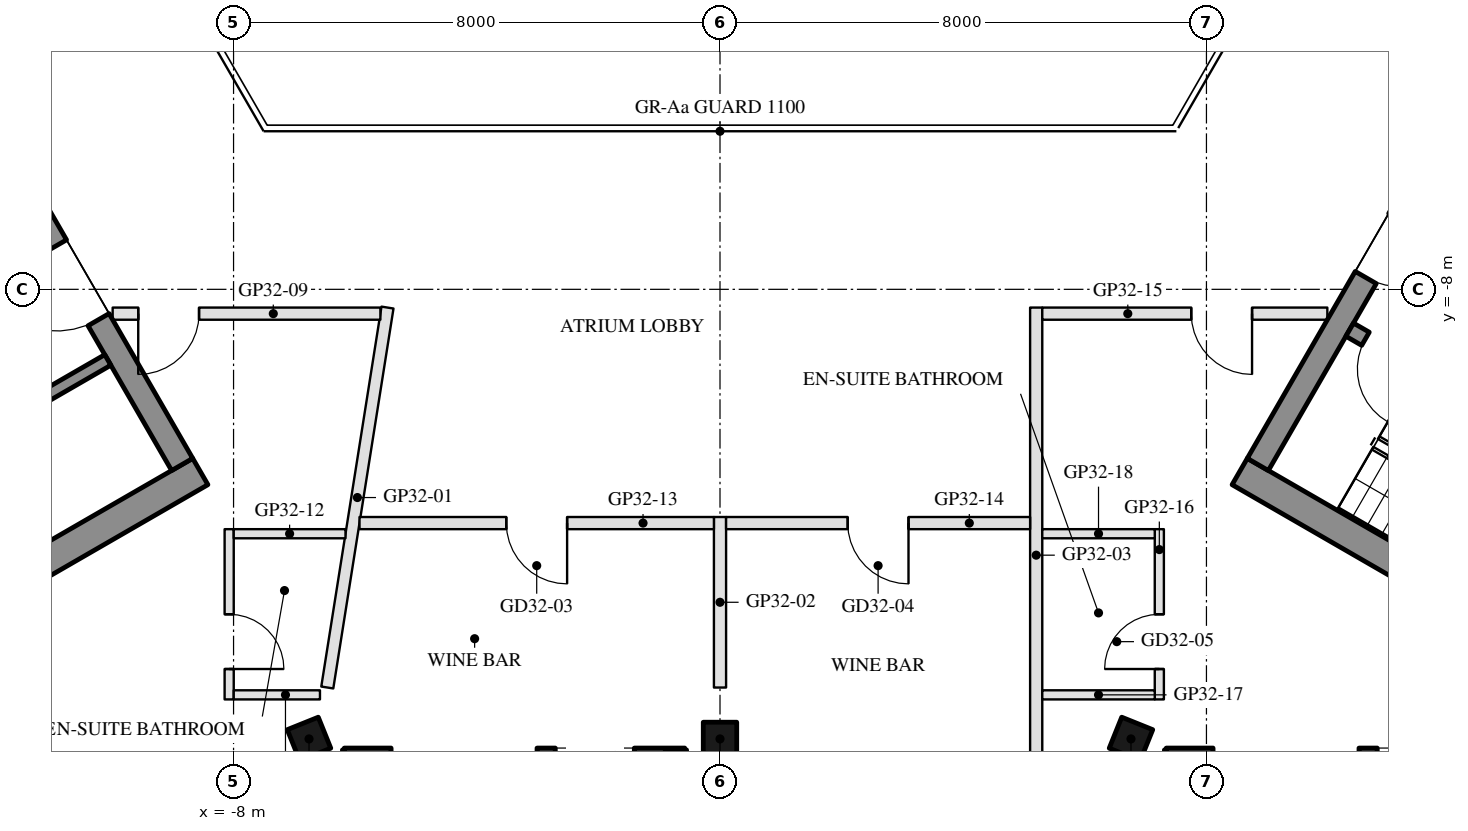
"""IFC4 building model, lengths in metres.
Left out: names, types, materials, properties, quantities, classifications, styles, units other than length and angle.
Written with IfcOpenShell. Run it as: python <this file> out.ifc"""

import sys

from ifc_helpers import new_model, si_unit, direction, frame, frame_2d, origin, origin_2d, place, context, subcontext, project, spatial, rectangle, hollow_rectangle, extrude, boolean, halfspace, element, fill, save


model = new_model("IFC4")
c1 = context("Model", 3, precision=1e-05, world=origin(), true_north=direction((0.0, 1.0)))
c2 = subcontext(c1, "Body", "Model", "MODEL_VIEW")
j1 = project(units=[si_unit("LENGTHUNIT", "METRE"), si_unit("PLANEANGLEUNIT", "RADIAN")], contexts=[c1])
p1 = place(None, origin())
s1 = spatial("IfcSite", under=j1, at=p1, CompositionType="ELEMENT")
p2 = place(p1, origin())
s2 = spatial("IfcBuilding", under=s1, at=p2, CompositionType="ELEMENT")
p3 = place(p2, frame((0.0, 0.0, 309.6)))
s3 = spatial("IfcBuildingStorey", under=s2, at=p3, CompositionType="ELEMENT", Elevation=309.6)
p4 = place(p3, frame((-6.759, -15.395, 0.0), z_axis=(0.060805602285, 0.151232777417, 0.986626234075), x_axis=(-0.998137511125, 0.004342411053, 0.060849423591)))
e1 = element("IfcColumn", 1, at=p4, inside=s3, PredefinedType="COLUMN", context=c2, shape_type="SweptSolid", body=[
    boolean("DIFFERENCE", boolean("DIFFERENCE", extrude(hollow_rectangle(XDim=0.55, YDim=0.55, WallThickness=0.025, at=origin_2d()), origin(), (0.0, 0.0, 1.0), 3.75), halfspace(frame((0.0, 0.0, 0.034), z_axis=(0.0, 0.0, 1.0), x_axis=(1.0, 0.0, 0.0)), True)), halfspace(frame((0.0, 0.0, 3.716), z_axis=(0.0, 0.0, 1.0), x_axis=(1.0, 0.0, 0.0)), False)),
])
p5 = place(p3, frame((0.0, -15.395, 0.0), z_axis=(0.0, 0.151513133163, 0.98845524455), x_axis=(-1.0, 0.0, 0.0)))
e2 = element("IfcColumn", 2, at=p5, inside=s3, PredefinedType="COLUMN", context=c2, shape_type="SweptSolid", body=[
    boolean("DIFFERENCE", boolean("DIFFERENCE", extrude(hollow_rectangle(XDim=0.55, YDim=0.55, WallThickness=0.025, at=origin_2d()), origin(), (0.0, 0.0, 1.0), 3.743), halfspace(frame((0.0, 0.0, 0.031), z_axis=(0.0, 0.0, 1.0), x_axis=(1.0, 0.0, 0.0)), True)), halfspace(frame((0.0, 0.0, 3.712), z_axis=(0.0, 0.0, 1.0), x_axis=(1.0, 0.0, 0.0)), False)),
])
p6 = place(p3, frame((6.759, -15.395, 0.0), z_axis=(-0.060805602285, 0.151232777417, 0.986626234075), x_axis=(0.998137511125, 0.004342411053, 0.060849423591)))
e3 = element("IfcColumn", 3, at=p6, inside=s3, PredefinedType="COLUMN", context=c2, shape_type="SweptSolid", body=[
    boolean("DIFFERENCE", boolean("DIFFERENCE", extrude(hollow_rectangle(XDim=0.55, YDim=0.55, WallThickness=0.025, at=origin_2d()), origin(), (0.0, 0.0, 1.0), 3.75), halfspace(frame((0.0, 0.0, 0.034), z_axis=(0.0, 0.0, 1.0), x_axis=(1.0, 0.0, 0.0)), True)), halfspace(frame((0.0, 0.0, 3.716), z_axis=(0.0, 0.0, 1.0), x_axis=(1.0, 0.0, 0.0)), False)),
])
p7 = place(p3, frame((-6.034, -16.795, 0.0), z_axis=(0.0, 0.0, 1.0), x_axis=(0.0, 1.0, 0.0)))
e4 = element("IfcWall", 4, at=p7, inside=s3, PredefinedType="SOLIDWALL", context=c2, shape_type="SweptSolid", body=[
    extrude(rectangle(XDim=1.22, YDim=0.35, at=frame_2d((0.61, 0.0))), origin(), (0.0, 0.0, 1.0), 3.55),
])
p8 = place(p3, frame((-6.179, -15.719, 0.0), z_axis=(0.0, 0.0, 1.0), x_axis=(1.0, 0.0, 0.0)))
e5 = element("IfcWall", 5, at=p8, inside=s3, PredefinedType="SOLIDWALL", context=c2, shape_type="SweptSolid", body=[
    extrude(rectangle(XDim=5.599, YDim=0.35, at=frame_2d((2.799, 0.0))), origin(), (0.0, 0.0, 1.0), 3.55),
])
p9 = place(p8, frame((0.77, 0.0, 0.0)))
e6 = element("IfcOpeningElement", 6, at=p9, cuts=e5, PredefinedType="OPENING", context=c2, shape_type="SweptSolid", body=[
    extrude(rectangle(XDim=2.4, YDim=2.4, at=frame_2d((1.2, 1.2))), frame((0.0, 0.185, 0.0), z_axis=(0.0, -1.0, 0.0), x_axis=(1.0, 0.0, 0.0)), (0.0, 0.0, 1.0), 0.37),
])
p10 = place(p8, frame((3.47, 0.0, 0.3)))
e7 = element("IfcOpeningElement", 7, at=p10, cuts=e5, PredefinedType="OPENING", context=c2, shape_type="SweptSolid", body=[
    extrude(rectangle(XDim=1.3, YDim=2.65, at=frame_2d((0.65, 1.325))), frame((0.0, 0.185, 0.0), z_axis=(0.0, -1.0, 0.0), x_axis=(1.0, 0.0, 0.0)), (0.0, 0.0, 1.0), 0.37),
])
for number, where, z_axis, x_axis in (
    (8, (-0.725, -15.575, 0.0), (0.0, 0.0, 1.0), (0.0, -1.0, 0.0)),
    (9, (7.484, -16.795, 0.0), (0.0, 0.0, 1.0), (0.0, 1.0, 0.0)),
):
    element("IfcWall", number, at=place(p3, frame(where, z_axis=z_axis, x_axis=x_axis)), inside=s3, PredefinedType="SOLIDWALL", context=c2, shape_type="SweptSolid", body=[
        extrude(rectangle(XDim=1.22, YDim=0.35, at=frame_2d((0.61, 0.0))), origin(), (0.0, 0.0, 1.0), 3.55),
    ])
p11 = place(p3, frame((7.339, -15.719, 0.0), z_axis=(0.0, 0.0, 1.0), x_axis=(1.0, 0.0, 0.0)))
e10 = element("IfcWall", 10, at=p11, inside=s3, PredefinedType="SOLIDWALL", context=c2, shape_type="SweptSolid", body=[
    extrude(rectangle(XDim=5.599, YDim=0.35, at=frame_2d((2.799, 0.0))), origin(), (0.0, 0.0, 1.0), 3.55),
])
p12 = place(p11, frame((0.77, 0.0, 0.0)))
e11 = element("IfcOpeningElement", 11, at=p12, cuts=e10, PredefinedType="OPENING", context=c2, shape_type="SweptSolid", body=[
    extrude(rectangle(XDim=2.4, YDim=2.4, at=frame_2d((1.2, 1.2))), frame((0.0, 0.185, 0.0), z_axis=(0.0, -1.0, 0.0), x_axis=(1.0, 0.0, 0.0)), (0.0, 0.0, 1.0), 0.37),
])
p13 = place(p11, frame((3.47, 0.0, 0.3)))
e12 = element("IfcOpeningElement", 12, at=p13, cuts=e10, PredefinedType="OPENING", context=c2, shape_type="SweptSolid", body=[
    extrude(rectangle(XDim=1.8, YDim=2.65, at=frame_2d((0.9, 1.325))), frame((0.0, 0.185, 0.0), z_axis=(0.0, -1.0, 0.0), x_axis=(1.0, 0.0, 0.0)), (0.0, 0.0, 1.0), 0.37),
])
p14 = place(p3, frame((-8.547, -10.997, 0.0), z_axis=(0.0, 0.0, 1.0), x_axis=(-0.866027279078, -0.499996751883, 0.0)))
e13 = element("IfcWall", 13, at=p14, inside=s3, PredefinedType="SHEAR", context=c2, shape_type="SweptSolid", body=[
    extrude(rectangle(XDim=10.298, YDim=0.5, at=frame_2d((5.149, 0.0))), origin(), (0.0, 0.0, 1.0), 3.5),
])
p15 = place(p3, frame((-13.845, -2.22, 0.0), z_axis=(0.0, 0.0, 1.0), x_axis=(0.500004234368, -0.866022959057, 0.0)))
e14 = element("IfcWall", 14, at=p15, inside=s3, PredefinedType="SHEAR", context=c2, shape_type="SweptSolid", body=[
    extrude(rectangle(XDim=10.0, YDim=0.4, at=frame_2d((5.0, 0.0))), origin(), (0.0, 0.0, 1.0), 3.5),
])
p16 = place(p15, frame((3.55, 0.0, 0.0)))
e15 = element("IfcOpeningElement", 15, at=p16, cuts=e14, PredefinedType="OPENING", context=c2, shape_type="SweptSolid", body=[
    extrude(rectangle(XDim=1.1, YDim=2.1, at=frame_2d((0.55, 1.05))), frame((0.0, 0.21, 0.0), z_axis=(0.0, -1.0, 0.0), x_axis=(1.0, 0.0, 0.0)), (0.0, 0.0, 1.0), 0.42),
])
p17 = place(p15, frame((5.85, 0.0, 0.0)))
e16 = element("IfcOpeningElement", 16, at=p17, cuts=e14, PredefinedType="OPENING", context=c2, shape_type="SweptSolid", body=[
    extrude(rectangle(XDim=1.4, YDim=2.1, at=frame_2d((0.7, 1.05))), frame((0.0, 0.21, 0.0), z_axis=(0.0, -1.0, 0.0), x_axis=(1.0, 0.0, 0.0)), (0.0, 0.0, 1.0), 0.42),
])
p18 = place(p3, frame((-10.068, -9.162, 0.0), z_axis=(0.0, 0.0, 1.0), x_axis=(-0.866032725843, -0.499987317609, 0.0)))
e17 = element("IfcWall", 17, at=p18, inside=s3, PredefinedType="SHEAR", context=c2, shape_type="SweptSolid", body=[
    extrude(rectangle(XDim=10.16, YDim=0.2, at=frame_2d((5.08, 0.0))), origin(), (0.0, 0.0, 1.0), 3.5),
])
p19 = place(p18, frame((1.99, 0.0, 0.0)))
e18 = element("IfcOpeningElement", 18, at=p19, cuts=e17, PredefinedType="OPENING", context=c2, shape_type="SweptSolid", body=[
    extrude(rectangle(XDim=0.9, YDim=2.1, at=frame_2d((0.45, 1.05))), frame((0.0, 0.11, 0.0), z_axis=(0.0, -1.0, 0.0), x_axis=(1.0, 0.0, 0.0)), (0.0, 0.0, 1.0), 0.22),
])
p20 = place(p18, frame((7.07, 0.0, 0.0)))
e19 = element("IfcOpeningElement", 19, at=p20, cuts=e17, PredefinedType="OPENING", context=c2, shape_type="SweptSolid", body=[
    extrude(rectangle(XDim=0.9, YDim=2.1, at=frame_2d((0.45, 1.05))), frame((0.0, 0.11, 0.0), z_axis=(0.0, -1.0, 0.0), x_axis=(1.0, 0.0, 0.0)), (0.0, 0.0, 1.0), 0.22),
])
p21 = place(p3, frame((8.547, -10.997, 0.0), z_axis=(0.0, 0.0, 1.0), x_axis=(0.866027279078, -0.499996751883, 0.0)))
e20 = element("IfcWall", 20, at=p21, inside=s3, PredefinedType="SHEAR", context=c2, shape_type="SweptSolid", body=[
    extrude(rectangle(XDim=10.298, YDim=0.5, at=frame_2d((5.149, 0.0))), origin(), (0.0, 0.0, 1.0), 3.5),
])
p22 = place(p3, frame((8.845, -10.88, 0.0), z_axis=(0.0, 0.0, 1.0), x_axis=(0.500004234368, 0.866022959057, 0.0)))
e21 = element("IfcWall", 21, at=p22, inside=s3, PredefinedType="SHEAR", context=c2, shape_type="SweptSolid", body=[
    extrude(rectangle(XDim=10.0, YDim=0.4, at=frame_2d((5.0, 0.0))), origin(), (0.0, 0.0, 1.0), 3.5),
])
p23 = place(p22, frame((3.55, 0.0, 0.0)))
e22 = element("IfcOpeningElement", 22, at=p23, cuts=e21, PredefinedType="OPENING", context=c2, shape_type="SweptSolid", body=[
    extrude(rectangle(XDim=1.1, YDim=2.1, at=frame_2d((0.55, 1.05))), frame((0.0, 0.21, 0.0), z_axis=(0.0, -1.0, 0.0), x_axis=(1.0, 0.0, 0.0)), (0.0, 0.0, 1.0), 0.42),
])
p24 = place(p22, frame((5.85, 0.0, 0.0)))
e23 = element("IfcOpeningElement", 23, at=p24, cuts=e21, PredefinedType="OPENING", context=c2, shape_type="SweptSolid", body=[
    extrude(rectangle(XDim=1.4, YDim=2.1, at=frame_2d((0.7, 1.05))), frame((0.0, 0.21, 0.0), z_axis=(0.0, -1.0, 0.0), x_axis=(1.0, 0.0, 0.0)), (0.0, 0.0, 1.0), 0.42),
])
p25 = place(p3, frame((10.356, -8.664, 0.0), z_axis=(0.0, 0.0, 1.0), x_axis=(0.866028629588, -0.499994412703, 0.0)))
e24 = element("IfcWall", 24, at=p25, inside=s3, PredefinedType="SHEAR", context=c2, shape_type="SweptSolid", body=[
    extrude(rectangle(XDim=6.45, YDim=0.25, at=frame_2d((3.225, 0.0))), origin(), (0.0, 0.0, 1.0), 3.5),
])
p26 = place(p25, frame((0.3, 0.0, 0.0)))
e25 = element("IfcOpeningElement", 25, at=p26, cuts=e24, PredefinedType="OPENING", context=c2, shape_type="SweptSolid", body=[
    extrude(rectangle(XDim=1.0, YDim=2.1, at=frame_2d((0.5, 1.05))), frame((0.0, 0.135, 0.0), z_axis=(0.0, -1.0, 0.0), x_axis=(1.0, 0.0, 0.0)), (0.0, 0.0, 1.0), 0.27),
])
p27 = place(p3, frame((-6.458, -14.549, 0.0), z_axis=(0.0, 0.0, 1.0), x_axis=(0.156515409126, 0.987675516911, 0.0)))
e26 = element("IfcWall", 26, at=p27, inside=s3, PredefinedType="PARTITIONING", context=c2, shape_type="SweptSolid", body=[
    extrude(rectangle(XDim=6.327, YDim=0.2, at=frame_2d((3.163, 0.0))), origin(), (0.0, 0.0, 1.0), 3.1),
])
p28 = place(p3, frame((0.0, -14.549, 0.0), z_axis=(0.0, 0.0, 1.0), x_axis=(0.0, 1.0, 0.0)))
e27 = element("IfcWall", 27, at=p28, inside=s3, PredefinedType="PARTITIONING", context=c2, shape_type="SweptSolid", body=[
    extrude(rectangle(XDim=2.805, YDim=0.2, at=frame_2d((1.402, 0.0))), origin(), (0.0, 0.0, 1.0), 3.1),
])
p29 = place(p3, frame((5.2, -16.445, 0.0), z_axis=(0.0, 0.0, 1.0), x_axis=(0.0, 1.0, 0.0)))
e28 = element("IfcWall", 28, at=p29, inside=s3, PredefinedType="PARTITIONING", context=c2, shape_type="SweptSolid", body=[
    extrude(rectangle(XDim=8.145, YDim=0.2, at=frame_2d((4.072, 0.0))), origin(), (0.0, 0.0, 1.0), 3.1),
])
p30 = place(p3, frame((-5.585, -8.4, 0.0), z_axis=(0.0, 0.0, 1.0), x_axis=(-1.0, 0.0, 0.0)))
e29 = element("IfcWall", 29, at=p30, inside=s3, PredefinedType="PARTITIONING", context=c2, shape_type="SweptSolid", body=[
    extrude(rectangle(XDim=4.403, YDim=0.2, at=frame_2d((2.201, 0.0))), origin(), (0.0, 0.0, 1.0), 3.1),
])
p31 = place(p30, frame((2.982, 0.0, 0.0)))
e30 = element("IfcOpeningElement", 30, at=p31, cuts=e29, PredefinedType="OPENING", context=c2, shape_type="SweptSolid", body=[
    extrude(rectangle(XDim=1.0, YDim=2.1, at=frame_2d((0.5, 1.05))), frame((0.0, 0.11, 0.0), z_axis=(0.0, -1.0, 0.0), x_axis=(1.0, 0.0, 0.0)), (0.0, 0.0, 1.0), 0.22),
])
p32 = place(p3, frame((-8.072, -11.945, 0.0), z_axis=(0.0, 0.0, 1.0), x_axis=(0.0, -1.0, 0.0)))
e31 = element("IfcWall", 31, at=p32, inside=s3, PredefinedType="PARTITIONING", context=c2, shape_type="SweptSolid", body=[
    extrude(rectangle(XDim=2.8, YDim=0.15, at=frame_2d((1.4, 0.0))), origin(), (0.0, 0.0, 1.0), 3.1),
])
p33 = place(p32, frame((1.4, 0.0, 0.0)))
e32 = element("IfcOpeningElement", 32, at=p33, cuts=e31, PredefinedType="OPENING", context=c2, shape_type="SweptSolid", body=[
    extrude(rectangle(XDim=0.9, YDim=2.1, at=frame_2d((0.45, 1.05))), frame((0.0, 0.085, 0.0), z_axis=(0.0, -1.0, 0.0), x_axis=(1.0, 0.0, 0.0)), (0.0, 0.0, 1.0), 0.17),
])
p34 = place(p3, frame((-7.997, -14.67, 0.0), z_axis=(0.0, 0.0, 1.0), x_axis=(1.0, 0.0, 0.0)))
e33 = element("IfcWall", 33, at=p34, inside=s3, PredefinedType="PARTITIONING", context=c2, shape_type="SweptSolid", body=[
    extrude(rectangle(XDim=1.418, YDim=0.15, at=frame_2d((0.709, 0.0))), origin(), (0.0, 0.0, 1.0), 3.1),
])
p35 = place(p3, frame((-7.997, -12.02, 0.0), z_axis=(0.0, 0.0, 1.0), x_axis=(1.0, 0.0, 0.0)))
e34 = element("IfcWall", 34, at=p35, inside=s3, PredefinedType="PARTITIONING", context=c2, shape_type="SweptSolid", body=[
    extrude(rectangle(XDim=1.838, YDim=0.15, at=frame_2d((0.919, 0.0))), origin(), (0.0, 0.0, 1.0), 3.1),
])
p36 = place(p3, frame((-0.1, -11.844, 0.0), z_axis=(0.0, 0.0, 1.0), x_axis=(-1.0, 0.0, 0.0)))
e35 = element("IfcWall", 35, at=p36, inside=s3, PredefinedType="PARTITIONING", context=c2, shape_type="SweptSolid", body=[
    extrude(rectangle(XDim=5.829, YDim=0.2, at=frame_2d((2.914, 0.0))), origin(), (0.0, 0.0, 1.0), 3.1),
])
p37 = place(p36, frame((2.414, 0.0, 0.0)))
e36 = element("IfcOpeningElement", 36, at=p37, cuts=e35, PredefinedType="OPENING", context=c2, shape_type="SweptSolid", body=[
    extrude(rectangle(XDim=1.0, YDim=2.1, at=frame_2d((0.5, 1.05))), frame((0.0, 0.11, 0.0), z_axis=(0.0, -1.0, 0.0), x_axis=(1.0, 0.0, 0.0)), (0.0, 0.0, 1.0), 0.22),
])
p38 = place(p3, frame((5.1, -11.844, 0.0), z_axis=(0.0, 0.0, 1.0), x_axis=(-1.0, 0.0, 0.0)))
e37 = element("IfcWall", 37, at=p38, inside=s3, PredefinedType="PARTITIONING", context=c2, shape_type="SweptSolid", body=[
    extrude(rectangle(XDim=5.0, YDim=0.2, at=frame_2d((2.5, 0.0))), origin(), (0.0, 0.0, 1.0), 3.1),
])
p39 = place(p38, frame((2.0, 0.0, 0.0)))
e38 = element("IfcOpeningElement", 38, at=p39, cuts=e37, PredefinedType="OPENING", context=c2, shape_type="SweptSolid", body=[
    extrude(rectangle(XDim=1.0, YDim=2.1, at=frame_2d((0.5, 1.05))), frame((0.0, 0.11, 0.0), z_axis=(0.0, -1.0, 0.0), x_axis=(1.0, 0.0, 0.0)), (0.0, 0.0, 1.0), 0.22),
])
p40 = place(p3, frame((9.988, -8.4, 0.0), z_axis=(0.0, 0.0, 1.0), x_axis=(-1.0, 0.0, 0.0)))
e39 = element("IfcWall", 39, at=p40, inside=s3, PredefinedType="PARTITIONING", context=c2, shape_type="SweptSolid", body=[
    extrude(rectangle(XDim=4.688, YDim=0.2, at=frame_2d((2.344, 0.0))), origin(), (0.0, 0.0, 1.0), 3.1),
])
p41 = place(p40, frame((1.238, 0.0, 0.0)))
e40 = element("IfcOpeningElement", 40, at=p41, cuts=e39, PredefinedType="OPENING", context=c2, shape_type="SweptSolid", body=[
    extrude(rectangle(XDim=1.0, YDim=2.1, at=frame_2d((0.5, 1.05))), frame((0.0, 0.11, 0.0), z_axis=(0.0, -1.0, 0.0), x_axis=(1.0, 0.0, 0.0)), (0.0, 0.0, 1.0), 0.22),
])
p42 = place(p3, frame((7.225, -14.745, 0.0), z_axis=(0.0, 0.0, 1.0), x_axis=(0.0, 1.0, 0.0)))
e41 = element("IfcWall", 41, at=p42, inside=s3, PredefinedType="PARTITIONING", context=c2, shape_type="SweptSolid", body=[
    extrude(rectangle(XDim=2.8, YDim=0.15, at=frame_2d((1.4, 0.0))), origin(), (0.0, 0.0, 1.0), 3.1),
])
p43 = place(p42, frame((0.5, 0.0, 0.0)))
e42 = element("IfcOpeningElement", 42, at=p43, cuts=e41, PredefinedType="OPENING", context=c2, shape_type="SweptSolid", body=[
    extrude(rectangle(XDim=0.9, YDim=2.1, at=frame_2d((0.45, 1.05))), frame((0.0, 0.085, 0.0), z_axis=(0.0, -1.0, 0.0), x_axis=(1.0, 0.0, 0.0)), (0.0, 0.0, 1.0), 0.17),
])
for number, where, z_axis, x_axis in (
    (43, (5.3, -14.67, 0.0), (0.0, 0.0, 1.0), (1.0, 0.0, 0.0)),
    (44, (5.3, -12.02, 0.0), (0.0, 0.0, 1.0), (1.0, 0.0, 0.0)),
):
    element("IfcWall", number, at=place(p3, frame(where, z_axis=z_axis, x_axis=x_axis)), inside=s3, PredefinedType="PARTITIONING", context=c2, shape_type="SweptSolid", body=[
        extrude(rectangle(XDim=1.85, YDim=0.15, at=frame_2d((0.925, 0.0))), origin(), (0.0, 0.0, 1.0), 3.1),
    ])
p44 = place(p3, frame((8.468, 2.133, 0.0), z_axis=(0.0, 0.0, 1.0), x_axis=(0.50001161234, -0.866018699293, 0.0)))
e45 = element("IfcWall", 45, at=p44, inside=s3, PredefinedType="PARTITIONING", context=c2, shape_type="SweptSolid", body=[
    extrude(rectangle(XDim=7.601, YDim=0.2, at=frame_2d((3.8, 0.0))), origin(), (0.0, 0.0, 1.0), 3.1),
])
p45 = place(p44, frame((2.464, 0.0, 0.0)))
e46 = element("IfcOpeningElement", 46, at=p45, cuts=e45, PredefinedType="OPENING", context=c2, shape_type="SweptSolid", body=[
    extrude(rectangle(XDim=1.0, YDim=2.1, at=frame_2d((0.5, 1.05))), frame((0.0, 0.11, 0.0), z_axis=(0.0, -1.0, 0.0), x_axis=(1.0, 0.0, 0.0)), (0.0, 0.0, 1.0), 0.22),
])
p46 = place(p3, frame((-12.269, -4.45, 0.0), z_axis=(0.0, 0.0, 1.0), x_axis=(0.500024296538, 0.866011375717, 0.0)))
e47 = element("IfcWall", 47, at=p46, inside=s3, PredefinedType="PARTITIONING", context=c2, shape_type="SweptSolid", body=[
    extrude(rectangle(XDim=6.488, YDim=0.2, at=frame_2d((3.244, 0.0))), origin(), (0.0, 0.0, 1.0), 3.1),
])
p47 = place(p46, frame((3.038, 0.0, 0.0)))
e48 = element("IfcOpeningElement", 48, at=p47, cuts=e47, PredefinedType="OPENING", context=c2, shape_type="SweptSolid", body=[
    extrude(rectangle(XDim=1.0, YDim=2.1, at=frame_2d((0.5, 1.05))), frame((0.0, 0.11, 0.0), z_axis=(0.0, -1.0, 0.0), x_axis=(1.0, 0.0, 0.0)), (0.0, 0.0, 1.0), 0.22),
])
p48 = place(p17, frame((1.4, 0.0, 0.0), z_axis=(0.0, 0.0, 1.0), x_axis=(-1.0, 0.0, 0.0)))
e49 = element("IfcDoor", 49, at=p48, inside=s3, OperationType="DOUBLE_DOOR_SINGLE_SWING", PredefinedType="DOOR", context=c2, shape_type="SweptSolid", body=[
    extrude(rectangle(XDim=1.4, YDim=2.1, at=frame_2d((0.7, 1.05))), frame((0.0, 0.025, 0.0), z_axis=(0.0, -1.0, 0.0), x_axis=(1.0, 0.0, 0.0)), (0.0, 0.0, 1.0), 0.05),
])
fill(e16, e49)
p49 = place(p23, frame((1.1, 0.0, 0.0), z_axis=(0.0, 0.0, 1.0), x_axis=(-1.0, 0.0, 0.0)))
e50 = element("IfcDoor", 50, at=p49, inside=s3, OperationType="SINGLE_SWING_LEFT", PredefinedType="DOOR", context=c2, shape_type="SweptSolid", body=[
    extrude(rectangle(XDim=1.1, YDim=2.1, at=frame_2d((0.55, 1.05))), frame((0.0, 0.025, 0.0), z_axis=(0.0, -1.0, 0.0), x_axis=(1.0, 0.0, 0.0)), (0.0, 0.0, 1.0), 0.05),
])
fill(e22, e50)
p50 = place(p26, frame((1.0, 0.0, 0.0), z_axis=(0.0, 0.0, 1.0), x_axis=(-1.0, 0.0, 0.0)))
e51 = element("IfcDoor", 51, at=p50, inside=s3, OperationType="SINGLE_SWING_LEFT", PredefinedType="DOOR", context=c2, shape_type="SweptSolid", body=[
    extrude(rectangle(XDim=1.0, YDim=2.1, at=frame_2d((0.5, 1.05))), frame((0.0, 0.025, 0.0), z_axis=(0.0, -1.0, 0.0), x_axis=(1.0, 0.0, 0.0)), (0.0, 0.0, 1.0), 0.05),
])
fill(e25, e51)
p51 = place(p33, origin())
e52 = element("IfcDoor", 52, at=p51, inside=s3, OperationType="SINGLE_SWING_RIGHT", PredefinedType="DOOR", context=c2, shape_type="SweptSolid", body=[
    extrude(rectangle(XDim=0.9, YDim=2.1, at=frame_2d((0.45, 1.05))), frame((0.0, 0.025, 0.0), z_axis=(0.0, -1.0, 0.0), x_axis=(1.0, 0.0, 0.0)), (0.0, 0.0, 1.0), 0.05),
])
fill(e32, e52)
p52 = place(p31, origin())
e53 = element("IfcDoor", 53, at=p52, inside=s3, OperationType="SINGLE_SWING_RIGHT", PredefinedType="DOOR", context=c2, shape_type="SweptSolid", body=[
    extrude(rectangle(XDim=1.0, YDim=2.1, at=frame_2d((0.5, 1.05))), frame((0.0, 0.025, 0.0), z_axis=(0.0, -1.0, 0.0), x_axis=(1.0, 0.0, 0.0)), (0.0, 0.0, 1.0), 0.05),
])
fill(e30, e53)
p53 = place(p37, origin())
e54 = element("IfcDoor", 54, at=p53, inside=s3, OperationType="SINGLE_SWING_LEFT", PredefinedType="DOOR", context=c2, shape_type="SweptSolid", body=[
    extrude(rectangle(XDim=1.0, YDim=2.1, at=frame_2d((0.5, 1.05))), frame((0.0, 0.025, 0.0), z_axis=(0.0, -1.0, 0.0), x_axis=(1.0, 0.0, 0.0)), (0.0, 0.0, 1.0), 0.05),
])
fill(e36, e54)
p54 = place(p39, origin())
e55 = element("IfcDoor", 55, at=p54, inside=s3, OperationType="SINGLE_SWING_LEFT", PredefinedType="DOOR", context=c2, shape_type="SweptSolid", body=[
    extrude(rectangle(XDim=1.0, YDim=2.1, at=frame_2d((0.5, 1.05))), frame((0.0, 0.025, 0.0), z_axis=(0.0, -1.0, 0.0), x_axis=(1.0, 0.0, 0.0)), (0.0, 0.0, 1.0), 0.05),
])
fill(e38, e55)
p55 = place(p43, origin())
e56 = element("IfcDoor", 56, at=p55, inside=s3, OperationType="SINGLE_SWING_LEFT", PredefinedType="DOOR", context=c2, shape_type="SweptSolid", body=[
    extrude(rectangle(XDim=0.9, YDim=2.1, at=frame_2d((0.45, 1.05))), frame((0.0, 0.025, 0.0), z_axis=(0.0, -1.0, 0.0), x_axis=(1.0, 0.0, 0.0)), (0.0, 0.0, 1.0), 0.05),
])
fill(e42, e56)
p56 = place(p41, origin())
e57 = element("IfcDoor", 57, at=p56, inside=s3, OperationType="SINGLE_SWING_LEFT", PredefinedType="DOOR", context=c2, shape_type="SweptSolid", body=[
    extrude(rectangle(XDim=1.0, YDim=2.1, at=frame_2d((0.5, 1.05))), frame((0.0, 0.025, 0.0), z_axis=(0.0, -1.0, 0.0), x_axis=(1.0, 0.0, 0.0)), (0.0, 0.0, 1.0), 0.05),
])
fill(e40, e57)
save(model, sys.argv[1])
